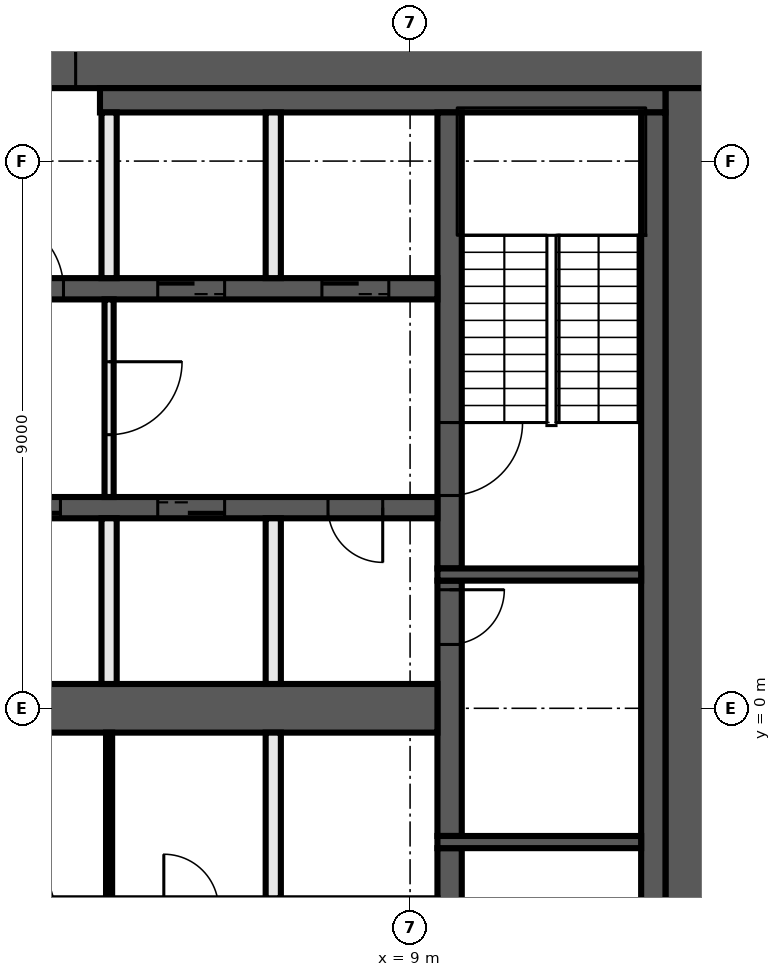
"""IFC4 building model, lengths in metres.
Left out: names, types, materials, properties, quantities, classifications, styles, units other than length and angle.
Written with IfcOpenShell. Run it as: python <this file> out.ifc"""

import sys

from ifc_helpers import new_model, si_unit, direction, frame, frame_2d, origin, place, context, subcontext, project, spatial, rectangle, extrude, element, fill, save


model = new_model("IFC4")
c1 = context("Model", 3, precision=1e-05, world=origin(), true_north=direction((0.0, 1.0)))
c2 = subcontext(c1, "Body", "Model", "MODEL_VIEW")
j1 = project(units=[si_unit("LENGTHUNIT", "METRE"), si_unit("PLANEANGLEUNIT", "RADIAN")], contexts=[c1])
p1 = place(None, origin())
s1 = spatial("IfcSite", under=j1, at=p1, CompositionType="ELEMENT")
p2 = place(p1, origin())
s2 = spatial("IfcBuilding", under=s1, at=p2, CompositionType="ELEMENT")
p3 = place(p2, frame((0.0, 0.0, 198.8)))
s3 = spatial("IfcBuildingStorey", under=s2, at=p3, CompositionType="ELEMENT", Elevation=198.8)
p4 = place(p3, frame((-14.0, 10.6, 0.0), z_axis=(0.0, 0.0, 1.0), x_axis=(1.0, 0.0, 0.0)))
e1 = element("IfcWall", 1, at=p4, inside=s3, PredefinedType="SHEAR", context=c2, shape_type="SweptSolid", body=[
    extrude(rectangle(XDim=28.0, YDim=0.8, at=frame_2d((14.0, 0.0))), origin(), (0.0, 0.0, 1.0), 3.82),
])
p5 = place(p4, frame((15.9, 0.0, 0.0)))
e2 = element("IfcOpeningElement", 2, at=p5, cuts=e1, PredefinedType="OPENING", context=c2, shape_type="SweptSolid", body=[
    extrude(rectangle(XDim=1.6, YDim=2.1, at=frame_2d((0.8, 1.05))), frame((0.0, 0.41, 0.0), z_axis=(0.0, -1.0, 0.0), x_axis=(1.0, 0.0, 0.0)), (0.0, 0.0, 1.0), 0.82),
])
p6 = place(p3, frame((13.6, 10.2, 0.0), z_axis=(0.0, 0.0, 1.0), x_axis=(0.0, -1.0, 0.0)))
e3 = element("IfcWall", 3, at=p6, inside=s3, PredefinedType="SHEAR", context=c2, shape_type="SweptSolid", body=[
    extrude(rectangle(XDim=20.4, YDim=0.8, at=frame_2d((10.2, 0.0))), origin(), (0.0, 0.0, 1.0), 3.82),
])
p7 = place(p3, frame((3.9, 10.0, 0.0), z_axis=(0.0, 0.0, 1.0), x_axis=(1.0, 0.0, 0.0)))
e4 = element("IfcWall", 4, at=p7, inside=s3, PredefinedType="SHEAR", context=c2, shape_type="SweptSolid", body=[
    extrude(rectangle(XDim=9.3, YDim=0.4, at=frame_2d((4.65, 0.0))), origin(), (0.0, 0.0, 1.0), 3.82),
])
p8 = place(p3, frame((13.0, 9.8, 0.0), z_axis=(0.0, 0.0, 1.0), x_axis=(0.0, -1.0, 0.0)))
e5 = element("IfcWall", 5, at=p8, inside=s3, PredefinedType="SHEAR", context=c2, shape_type="SweptSolid", body=[
    extrude(rectangle(XDim=19.6, YDim=0.4, at=frame_2d((9.8, 0.0))), origin(), (0.0, 0.0, 1.0), 3.82),
])
p9 = place(p3, frame((9.65, -2.3, 0.0), z_axis=(0.0, 0.0, 1.0), x_axis=(0.0, -1.0, 0.0)))
e6 = element("IfcWall", 6, at=p9, inside=s3, PredefinedType="SHEAR", context=c2, shape_type="SweptSolid", body=[
    extrude(rectangle(XDim=7.5, YDim=0.4, at=frame_2d((3.75, 0.0))), origin(), (0.0, 0.0, 1.0), 3.82),
])
p10 = place(p9, frame((1.2, 0.0, 0.0)))
e7 = element("IfcOpeningElement", 7, at=p10, cuts=e6, PredefinedType="OPENING", context=c2, shape_type="SweptSolid", body=[
    extrude(rectangle(XDim=1.2, YDim=2.1, at=frame_2d((0.6, 1.05))), frame((0.0, 0.21, 0.0), z_axis=(0.0, -1.0, 0.0), x_axis=(1.0, 0.0, 0.0)), (0.0, 0.0, 1.0), 0.42),
])
p11 = place(p3, frame((9.65, 2.1, 0.0), z_axis=(0.0, 0.0, 1.0), x_axis=(0.0, -1.0, 0.0)))
e8 = element("IfcWall", 8, at=p11, inside=s3, PredefinedType="SHEAR", context=c2, shape_type="SweptSolid", body=[
    extrude(rectangle(XDim=4.2, YDim=0.4, at=frame_2d((2.1, 0.0))), origin(), (0.0, 0.0, 1.0), 3.82),
])
p12 = place(p11, frame((0.15, 0.0, 0.0)))
e9 = element("IfcOpeningElement", 9, at=p12, cuts=e8, PredefinedType="OPENING", context=c2, shape_type="SweptSolid", body=[
    extrude(rectangle(XDim=0.9, YDim=2.1, at=frame_2d((0.45, 1.05))), frame((0.0, 0.21, 0.0), z_axis=(0.0, -1.0, 0.0), x_axis=(1.0, 0.0, 0.0)), (0.0, 0.0, 1.0), 0.42),
])
p13 = place(p3, frame((9.65, 9.8, 0.0), z_axis=(0.0, 0.0, 1.0), x_axis=(0.0, -1.0, 0.0)))
e10 = element("IfcWall", 10, at=p13, inside=s3, PredefinedType="SHEAR", context=c2, shape_type="SweptSolid", body=[
    extrude(rectangle(XDim=7.5, YDim=0.4, at=frame_2d((3.75, 0.0))), origin(), (0.0, 0.0, 1.0), 3.82),
])
p14 = place(p13, frame((5.1, 0.0, 0.0)))
e11 = element("IfcOpeningElement", 11, at=p14, cuts=e10, PredefinedType="OPENING", context=c2, shape_type="SweptSolid", body=[
    extrude(rectangle(XDim=1.2, YDim=2.1, at=frame_2d((0.6, 1.05))), frame((0.0, 0.21, 0.0), z_axis=(0.0, -1.0, 0.0), x_axis=(1.0, 0.0, 0.0)), (0.0, 0.0, 1.0), 0.42),
])
for number, where, z_axis, x_axis in (
    (12, (9.45, 2.2, 0.0), (0.0, 0.0, 1.0), (1.0, 0.0, 0.0)),
    (13, (9.45, -2.2, 0.0), (0.0, 0.0, 1.0), (1.0, 0.0, 0.0)),
):
    element("IfcWall", number, at=place(p3, frame(where, z_axis=z_axis, x_axis=x_axis)), inside=s3, PredefinedType="SHEAR", context=c2, shape_type="SweptSolid", body=[
        extrude(rectangle(XDim=3.35, YDim=0.2, at=frame_2d((1.675, 0.0))), origin(), (0.0, 0.0, 1.0), 3.82),
    ])
p15 = place(p3, frame((-9.45, 6.9, 0.0), z_axis=(0.0, 0.0, 1.0), x_axis=(1.0, 0.0, 0.0)))
e14 = element("IfcWall", 14, at=p15, inside=s3, PredefinedType="SHEAR", context=c2, shape_type="SweptSolid", body=[
    extrude(rectangle(XDim=18.9, YDim=0.35, at=frame_2d((9.45, 0.0))), origin(), (0.0, 0.0, 1.0), 3.82),
])
p16 = place(p15, frame((11.55, 0.0, 0.0)))
e15 = element("IfcOpeningElement", 15, at=p16, cuts=e14, PredefinedType="OPENING", context=c2, shape_type="SweptSolid", body=[
    extrude(rectangle(XDim=1.2, YDim=2.1, at=frame_2d((0.6, 1.05))), frame((0.0, 0.185, 0.0), z_axis=(0.0, -1.0, 0.0), x_axis=(1.0, 0.0, 0.0)), (0.0, 0.0, 1.0), 0.37),
])
p17 = place(p15, frame((14.3, 0.0, 0.0)))
e16 = element("IfcOpeningElement", 16, at=p17, cuts=e14, PredefinedType="OPENING", context=c2, shape_type="SweptSolid", body=[
    extrude(rectangle(XDim=1.1, YDim=2.1, at=frame_2d((0.55, 1.05))), frame((0.0, 0.185, 0.0), z_axis=(0.0, -1.0, 0.0), x_axis=(1.0, 0.0, 0.0)), (0.0, 0.0, 1.0), 0.37),
])
p18 = place(p15, frame((17.0, 0.0, 0.0)))
e17 = element("IfcOpeningElement", 17, at=p18, cuts=e14, PredefinedType="OPENING", context=c2, shape_type="SweptSolid", body=[
    extrude(rectangle(XDim=1.1, YDim=2.1, at=frame_2d((0.55, 1.05))), frame((0.0, 0.185, 0.0), z_axis=(0.0, -1.0, 0.0), x_axis=(1.0, 0.0, 0.0)), (0.0, 0.0, 1.0), 0.37),
])
p19 = place(p15, frame((0.9, 0.0, 0.0)))
e18 = element("IfcOpeningElement", 18, at=p19, cuts=e14, PredefinedType="OPENING", context=c2, shape_type="SweptSolid", body=[
    extrude(rectangle(XDim=0.9, YDim=2.1, at=frame_2d((0.45, 1.05))), frame((0.0, 0.185, 0.0), z_axis=(0.0, -1.0, 0.0), x_axis=(1.0, 0.0, 0.0)), (0.0, 0.0, 1.0), 0.37),
])
p20 = place(p15, frame((4.95, 0.0, 0.0)))
e19 = element("IfcOpeningElement", 19, at=p20, cuts=e14, PredefinedType="OPENING", context=c2, shape_type="SweptSolid", body=[
    extrude(rectangle(XDim=0.9, YDim=2.1, at=frame_2d((0.45, 1.05))), frame((0.0, 0.185, 0.0), z_axis=(0.0, -1.0, 0.0), x_axis=(1.0, 0.0, 0.0)), (0.0, 0.0, 1.0), 0.37),
])
p21 = place(p15, frame((9.0, 0.0, 0.0)))
e20 = element("IfcOpeningElement", 20, at=p21, cuts=e14, PredefinedType="OPENING", context=c2, shape_type="SweptSolid", body=[
    extrude(rectangle(XDim=0.9, YDim=2.1, at=frame_2d((0.45, 1.05))), frame((0.0, 0.185, 0.0), z_axis=(0.0, -1.0, 0.0), x_axis=(1.0, 0.0, 0.0)), (0.0, 0.0, 1.0), 0.37),
])
p22 = place(p3, frame((9.45, 3.3, 0.0), z_axis=(0.0, 0.0, 1.0), x_axis=(-1.0, 0.0, 0.0)))
e21 = element("IfcWall", 21, at=p22, inside=s3, PredefinedType="SHEAR", context=c2, shape_type="SweptSolid", body=[
    extrude(rectangle(XDim=18.9, YDim=0.35, at=frame_2d((9.45, 0.0))), origin(), (0.0, 0.0, 1.0), 3.82),
])
p23 = place(p22, frame((6.2, 0.0, 0.0)))
e22 = element("IfcOpeningElement", 22, at=p23, cuts=e21, PredefinedType="OPENING", context=c2, shape_type="SweptSolid", body=[
    extrude(rectangle(XDim=1.1, YDim=2.1, at=frame_2d((0.55, 1.05))), frame((0.0, 0.185, 0.0), z_axis=(0.0, -1.0, 0.0), x_axis=(1.0, 0.0, 0.0)), (0.0, 0.0, 1.0), 0.37),
])
p24 = place(p22, frame((3.5, 0.0, 0.0)))
e23 = element("IfcOpeningElement", 23, at=p24, cuts=e21, PredefinedType="OPENING", context=c2, shape_type="SweptSolid", body=[
    extrude(rectangle(XDim=1.1, YDim=2.1, at=frame_2d((0.55, 1.05))), frame((0.0, 0.185, 0.0), z_axis=(0.0, -1.0, 0.0), x_axis=(1.0, 0.0, 0.0)), (0.0, 0.0, 1.0), 0.37),
])
p25 = place(p22, frame((0.9, 0.0, 0.0)))
e24 = element("IfcOpeningElement", 24, at=p25, cuts=e21, PredefinedType="OPENING", context=c2, shape_type="SweptSolid", body=[
    extrude(rectangle(XDim=0.9, YDim=2.1, at=frame_2d((0.45, 1.05))), frame((0.0, 0.185, 0.0), z_axis=(0.0, -1.0, 0.0), x_axis=(1.0, 0.0, 0.0)), (0.0, 0.0, 1.0), 0.37),
])
p26 = place(p22, frame((15.75, 0.0, 0.0)))
e25 = element("IfcOpeningElement", 25, at=p26, cuts=e21, PredefinedType="OPENING", context=c2, shape_type="SweptSolid", body=[
    extrude(rectangle(XDim=0.9, YDim=2.1, at=frame_2d((0.45, 1.05))), frame((0.0, 0.185, 0.0), z_axis=(0.0, -1.0, 0.0), x_axis=(1.0, 0.0, 0.0)), (0.0, 0.0, 1.0), 0.37),
])
p27 = place(p22, frame((10.35, 0.0, 0.0)))
e26 = element("IfcOpeningElement", 26, at=p27, cuts=e21, PredefinedType="OPENING", context=c2, shape_type="SweptSolid", body=[
    extrude(rectangle(XDim=0.9, YDim=2.1, at=frame_2d((0.45, 1.05))), frame((0.0, 0.185, 0.0), z_axis=(0.0, -1.0, 0.0), x_axis=(1.0, 0.0, 0.0)), (0.0, 0.0, 1.0), 0.37),
])
p28 = place(p3, frame((-9.45, 0.0, 0.0), z_axis=(0.0, 0.0, 1.0), x_axis=(1.0, 0.0, 0.0)))
e27 = element("IfcWall", 27, at=p28, inside=s3, PredefinedType="SHEAR", context=c2, shape_type="SweptSolid", body=[
    extrude(rectangle(XDim=18.9, YDim=0.8, at=frame_2d((9.45, 0.0))), origin(), (0.0, 0.0, 1.0), 3.82),
])
for number, where, z_axis, x_axis in (
    (28, (6.75, -3.125, 0.0), (0.0, 0.0, 1.0), (0.0, 1.0, 0.0)),
    (29, (6.75, 0.4, 0.0), (0.0, 0.0, 1.0), (0.0, 1.0, 0.0)),
    (30, (6.75, 7.075, 0.0), (0.0, 0.0, 1.0), (0.0, 1.0, 0.0)),
):
    element("IfcWall", number, at=place(p3, frame(where, z_axis=z_axis, x_axis=x_axis)), inside=s3, PredefinedType="SOLIDWALL", context=c2, shape_type="SweptSolid", body=[
        extrude(rectangle(XDim=2.725, YDim=0.25, at=frame_2d((1.363, 0.0))), origin(), (0.0, 0.0, 1.0), 3.82),
    ])
p29 = place(p3, frame((4.05, 6.725, 0.0), z_axis=(0.0, 0.0, 1.0), x_axis=(0.0, -1.0, 0.0)))
e31 = element("IfcWall", 31, at=p29, inside=s3, PredefinedType="PARTITIONING", context=c2, shape_type="SweptSolid", body=[
    extrude(rectangle(XDim=3.25, YDim=0.15, at=frame_2d((1.625, 0.0))), origin(), (0.0, 0.0, 1.0), 3.82),
])
p30 = place(p29, frame((1.025, 0.0, 0.0)))
e32 = element("IfcOpeningElement", 32, at=p30, cuts=e31, PredefinedType="OPENING", context=c2, shape_type="SweptSolid", body=[
    extrude(rectangle(XDim=1.2, YDim=2.1, at=frame_2d((0.6, 1.05))), frame((0.0, 0.085, 0.0), z_axis=(0.0, -1.0, 0.0), x_axis=(1.0, 0.0, 0.0)), (0.0, 0.0, 1.0), 0.17),
])
p31 = place(p3, frame((4.05, -3.125, 0.0), z_axis=(0.0, 0.0, 1.0), x_axis=(0.0, 1.0, 0.0)))
e33 = element("IfcWall", 33, at=p31, inside=s3, PredefinedType="PARTITIONING", context=c2, shape_type="SweptSolid", body=[
    extrude(rectangle(XDim=2.725, YDim=0.1, at=frame_2d((1.363, 0.0))), origin(), (0.0, 0.0, 1.0), 3.82),
])
for number, where, z_axis, x_axis in (
    (34, (4.05, 0.4, 0.0), (0.0, 0.0, 1.0), (0.0, 1.0, 0.0)),
    (35, (4.05, 7.075, 0.0), (0.0, 0.0, 1.0), (0.0, 1.0, 0.0)),
):
    element("IfcWall", number, at=place(p3, frame(where, z_axis=z_axis, x_axis=x_axis)), inside=s3, PredefinedType="SOLIDWALL", context=c2, shape_type="SweptSolid", body=[
        extrude(rectangle(XDim=2.725, YDim=0.25, at=frame_2d((1.363, 0.0))), origin(), (0.0, 0.0, 1.0), 3.82),
    ])
p32 = place(p12, origin())
e36 = element("IfcDoor", 36, at=p32, inside=s3, OperationType="SINGLE_SWING_RIGHT", PredefinedType="DOOR", context=c2, shape_type="SweptSolid", body=[
    extrude(rectangle(XDim=0.9, YDim=2.1, at=frame_2d((0.45, 1.05))), frame((0.0, 0.025, 0.0), z_axis=(0.0, -1.0, 0.0), x_axis=(1.0, 0.0, 0.0)), (0.0, 0.0, 1.0), 0.05),
])
fill(e9, e36)
p33 = place(p5, origin())
e37 = element("IfcDoor", 37, at=p33, inside=s3, OperationType="DOUBLE_DOOR_SINGLE_SWING", PredefinedType="DOOR", context=c2, shape_type="SweptSolid", body=[
    extrude(rectangle(XDim=1.6, YDim=2.1, at=frame_2d((0.8, 1.05))), frame((0.0, 0.025, 0.0), z_axis=(0.0, -1.0, 0.0), x_axis=(1.0, 0.0, 0.0)), (0.0, 0.0, 1.0), 0.05),
])
fill(e2, e37)
p34 = place(p16, origin())
e38 = element("IfcDoor", 38, at=p34, inside=s3, OperationType="SINGLE_SWING_LEFT", PredefinedType="DOOR", context=c2, shape_type="SweptSolid", body=[
    extrude(rectangle(XDim=1.2, YDim=2.1, at=frame_2d((0.6, 1.05))), frame((0.0, 0.025, 0.0), z_axis=(0.0, -1.0, 0.0), x_axis=(1.0, 0.0, 0.0)), (0.0, 0.0, 1.0), 0.05),
])
fill(e15, e38)
p35 = place(p17, origin())
e39 = element("IfcDoor", 39, at=p35, inside=s3, OperationType="DOUBLE_DOOR_SLIDING", PredefinedType="DOOR", context=c2, shape_type="SweptSolid", body=[
    extrude(rectangle(XDim=1.1, YDim=2.1, at=frame_2d((0.55, 1.05))), frame((0.0, 0.025, 0.0), z_axis=(0.0, -1.0, 0.0), x_axis=(1.0, 0.0, 0.0)), (0.0, 0.0, 1.0), 0.05),
])
fill(e16, e39)
p36 = place(p18, origin())
e40 = element("IfcDoor", 40, at=p36, inside=s3, OperationType="DOUBLE_DOOR_SLIDING", PredefinedType="DOOR", context=c2, shape_type="SweptSolid", body=[
    extrude(rectangle(XDim=1.1, YDim=2.1, at=frame_2d((0.55, 1.05))), frame((0.0, 0.025, 0.0), z_axis=(0.0, -1.0, 0.0), x_axis=(1.0, 0.0, 0.0)), (0.0, 0.0, 1.0), 0.05),
])
fill(e17, e40)
p37 = place(p23, origin())
e41 = element("IfcDoor", 41, at=p37, inside=s3, OperationType="DOUBLE_DOOR_SLIDING", PredefinedType="DOOR", context=c2, shape_type="SweptSolid", body=[
    extrude(rectangle(XDim=1.1, YDim=2.1, at=frame_2d((0.55, 1.05))), frame((0.0, 0.025, 0.0), z_axis=(0.0, -1.0, 0.0), x_axis=(1.0, 0.0, 0.0)), (0.0, 0.0, 1.0), 0.05),
])
fill(e22, e41)
p38 = place(p24, origin())
e42 = element("IfcDoor", 42, at=p38, inside=s3, OperationType="DOUBLE_DOOR_SLIDING", PredefinedType="DOOR", context=c2, shape_type="SweptSolid", body=[
    extrude(rectangle(XDim=1.1, YDim=2.1, at=frame_2d((0.55, 1.05))), frame((0.0, 0.025, 0.0), z_axis=(0.0, -1.0, 0.0), x_axis=(1.0, 0.0, 0.0)), (0.0, 0.0, 1.0), 0.05),
])
fill(e23, e42)
p39 = place(p25, origin())
e43 = element("IfcDoor", 43, at=p39, inside=s3, OperationType="SINGLE_SWING_LEFT", PredefinedType="DOOR", context=c2, shape_type="SweptSolid", body=[
    extrude(rectangle(XDim=0.9, YDim=2.1, at=frame_2d((0.45, 1.05))), frame((0.0, 0.025, 0.0), z_axis=(0.0, -1.0, 0.0), x_axis=(1.0, 0.0, 0.0)), (0.0, 0.0, 1.0), 0.05),
])
fill(e24, e43)
p40 = place(p14, origin())
e44 = element("IfcDoor", 44, at=p40, inside=s3, OperationType="SINGLE_SWING_LEFT", PredefinedType="DOOR", context=c2, shape_type="SweptSolid", body=[
    extrude(rectangle(XDim=1.2, YDim=2.1, at=frame_2d((0.6, 1.05))), frame((0.0, 0.025, 0.0), z_axis=(0.0, -1.0, 0.0), x_axis=(1.0, 0.0, 0.0)), (0.0, 0.0, 1.0), 0.05),
])
fill(e11, e44)
p41 = place(p30, origin())
e45 = element("IfcDoor", 45, at=p41, inside=s3, OperationType="SINGLE_SWING_RIGHT", PredefinedType="DOOR", context=c2, shape_type="SweptSolid", body=[
    extrude(rectangle(XDim=1.2, YDim=2.1, at=frame_2d((0.6, 1.05))), frame((0.0, 0.025, 0.0), z_axis=(0.0, -1.0, 0.0), x_axis=(1.0, 0.0, 0.0)), (0.0, 0.0, 1.0), 0.05),
])
fill(e32, e45)
save(model, sys.argv[1])
